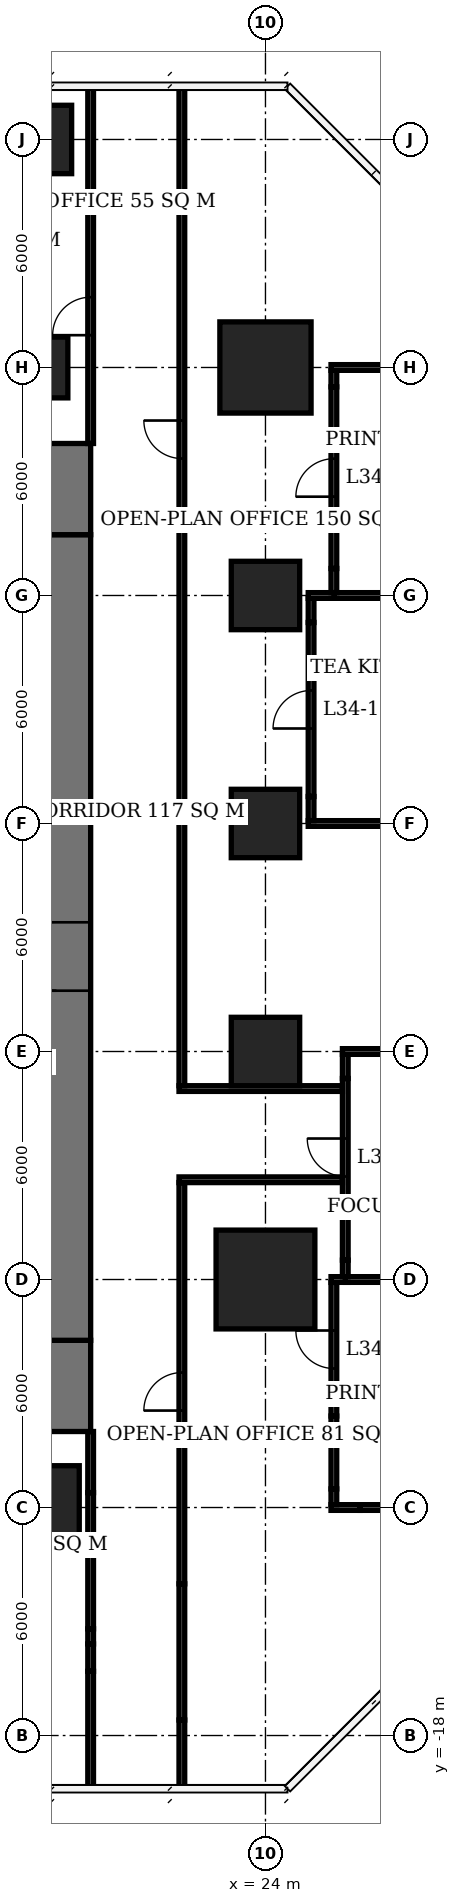
"""IFC4 building model, lengths in metres.
Left out: names, types, materials, properties, quantities, classifications, styles, units other than length and angle.
Written with IfcOpenShell. Run it as: python <this file> out.ifc"""

import sys

from ifc_helpers import new_model, si_unit, direction, frame, frame_2d, origin, origin_2d, place, context, subcontext, project, spatial, rectangle, extrude, element, fill, save


model = new_model("IFC4")
c1 = context("Model", 3, precision=1e-05, world=origin(), true_north=direction((0.0, 1.0)))
c2 = subcontext(c1, "Body", "Model", "MODEL_VIEW")
j1 = project(units=[si_unit("LENGTHUNIT", "METRE"), si_unit("PLANEANGLEUNIT", "RADIAN")], contexts=[c1])
p1 = place(None, origin())
s1 = spatial("IfcSite", under=j1, at=p1, CompositionType="ELEMENT")
p2 = place(p1, origin())
s2 = spatial("IfcBuilding", under=s1, at=p2, CompositionType="ELEMENT")
p3 = place(p2, frame((0.0, 0.0, 140.6)))
s3 = spatial("IfcBuildingStorey", under=s2, at=p3, CompositionType="ELEMENT", Elevation=140.6)
p4 = place(p3, frame((18.0, -12.0, 0.0), z_axis=(0.0, 0.0, 1.0), x_axis=(1.0, 0.0, 0.0)))
e1 = element("IfcColumn", 1, at=p4, inside=s3, PredefinedType="COLUMN", context=c2, shape_type="SweptSolid", body=[
    extrude(rectangle(XDim=2.2, YDim=2.2, at=origin_2d()), origin(), (0.0, 0.0, 1.0), 3.9),
])
p5 = place(p3, frame((18.0, 18.0, 0.0), z_axis=(0.0, 0.0, 1.0), x_axis=(1.0, 0.0, 0.0)))
e2 = element("IfcColumn", 2, at=p5, inside=s3, PredefinedType="COLUMN", context=c2, shape_type="SweptSolid", body=[
    extrude(rectangle(XDim=1.6, YDim=1.6, at=origin_2d()), origin(), (0.0, 0.0, 1.0), 3.9),
])
p6 = place(p3, frame((18.0, 24.0, 0.0), z_axis=(0.0, 0.0, 1.0), x_axis=(1.0, 0.0, 0.0)))
e3 = element("IfcColumn", 3, at=p6, inside=s3, PredefinedType="COLUMN", context=c2, shape_type="SweptSolid", body=[
    extrude(rectangle(XDim=1.8, YDim=1.8, at=origin_2d()), origin(), (0.0, 0.0, 1.0), 3.9),
])
p7 = place(p3, frame((24.0, -6.0, 0.0), z_axis=(0.0, 0.0, 1.0), x_axis=(1.0, 0.0, 0.0)))
e4 = element("IfcColumn", 4, at=p7, inside=s3, PredefinedType="COLUMN", context=c2, shape_type="SweptSolid", body=[
    extrude(rectangle(XDim=2.6, YDim=2.6, at=origin_2d()), origin(), (0.0, 0.0, 1.0), 3.9),
])
for number, where, z_axis, x_axis in (
    (5, (24.0, 0.0, 0.0), (0.0, 0.0, 1.0), (1.0, 0.0, 0.0)),
    (6, (24.0, 6.0, 0.0), (0.0, 0.0, 1.0), (1.0, 0.0, 0.0)),
    (7, (24.0, 12.0, 0.0), (0.0, 0.0, 1.0), (1.0, 0.0, 0.0)),
):
    element("IfcColumn", number, at=place(p3, frame(where, z_axis=z_axis, x_axis=x_axis)), inside=s3, PredefinedType="COLUMN", context=c2, shape_type="SweptSolid", body=[
        extrude(rectangle(XDim=1.8, YDim=1.8, at=origin_2d()), origin(), (0.0, 0.0, 1.0), 3.9),
    ])
p8 = place(p3, frame((24.0, 18.0, 0.0), z_axis=(0.0, 0.0, 1.0), x_axis=(1.0, 0.0, 0.0)))
e8 = element("IfcColumn", 8, at=p8, inside=s3, PredefinedType="COLUMN", context=c2, shape_type="SweptSolid", body=[
    extrude(rectangle(XDim=2.4, YDim=2.4, at=origin_2d()), origin(), (0.0, 0.0, 1.0), 3.9),
])
p9 = place(p3, frame((18.5, -7.6, 0.0), z_axis=(0.0, 0.0, 1.0), x_axis=(0.0, 1.0, 0.0)))
e9 = element("IfcWall", 9, at=p9, inside=s3, PredefinedType="SHEAR", context=c2, shape_type="SweptSolid", body=[
    extrude(rectangle(XDim=21.2, YDim=1.8, at=frame_2d((10.6, 0.0))), origin(), (0.0, 0.0, 1.0), 3.9),
])
p10 = place(p9, frame((9.2, 0.0, 0.0)))
e10 = element("IfcOpeningElement", 10, at=p10, cuts=e9, PredefinedType="OPENING", context=c2, shape_type="SweptSolid", body=[
    extrude(rectangle(XDim=1.8, YDim=2.4, at=frame_2d((0.9, 1.2))), frame((0.0, 0.91, 0.0), z_axis=(0.0, -1.0, 0.0), x_axis=(1.0, 0.0, 0.0)), (0.0, 0.0, 1.0), 1.82),
])
for number, where, z_axis, x_axis in (
    (11, (18.5, -10.0, 0.0), (0.0, 0.0, 1.0), (0.0, 1.0, 0.0)),
    (12, (18.5, 13.6, 0.0), (0.0, 0.0, 1.0), (0.0, 1.0, 0.0)),
):
    element("IfcWall", number, at=place(p3, frame(where, z_axis=z_axis, x_axis=x_axis)), inside=s3, PredefinedType="SHEAR", context=c2, shape_type="SweptSolid", body=[
        extrude(rectangle(XDim=2.4, YDim=1.8, at=frame_2d((1.2, 0.0))), origin(), (0.0, 0.0, 1.0), 3.9),
    ])
p11 = place(p3, frame((25.725, -12.0, 0.0), z_axis=(0.0, 0.0, 1.0), x_axis=(1.0, 0.0, 0.0)))
e13 = element("IfcWall", 13, at=p11, inside=s3, PredefinedType="PARTITIONING", context=c2, shape_type="SweptSolid", body=[
    extrude(rectangle(XDim=0.765, YDim=0.15, at=frame_2d((0.382, 0.0))), origin(), (0.0, 0.0, 1.0), 2.65),
])
p12 = place(p3, frame((26.49, -12.0, 0.0), z_axis=(0.0, 0.0, 1.0), x_axis=(1.0, 0.0, 0.0)))
e14 = element("IfcWall", 14, at=p12, inside=s3, PredefinedType="PARTITIONING", context=c2, shape_type="SweptSolid", body=[
    extrude(rectangle(XDim=1.718, YDim=0.15, at=frame_2d((0.859, 0.0))), origin(), (0.0, 0.0, 1.0), 3.65),
])
p13 = place(p3, frame((25.725, -6.0, 0.0), z_axis=(0.0, 0.0, 1.0), x_axis=(1.0, 0.0, 0.0)))
e15 = element("IfcWall", 15, at=p13, inside=s3, PredefinedType="PARTITIONING", context=c2, shape_type="SweptSolid", body=[
    extrude(rectangle(XDim=0.45, YDim=0.15, at=frame_2d((0.225, 0.0))), origin(), (0.0, 0.0, 1.0), 2.65),
])
p14 = place(p3, frame((26.1, -6.0, 0.0), z_axis=(0.0, 0.0, 1.0), x_axis=(1.0, 0.0, 0.0)))
e16 = element("IfcWall", 16, at=p14, inside=s3, PredefinedType="PARTITIONING", context=c2, shape_type="SweptSolid", body=[
    extrude(rectangle(XDim=2.21, YDim=0.15, at=frame_2d((1.105, 0.0))), origin(), (0.0, 0.0, 1.0), 2.65),
])
p15 = place(p3, frame((26.025, 0.0, 0.0), z_axis=(0.0, 0.0, 1.0), x_axis=(1.0, 0.0, 0.0)))
e17 = element("IfcWall", 17, at=p15, inside=s3, PredefinedType="PARTITIONING", context=c2, shape_type="SweptSolid", body=[
    extrude(rectangle(XDim=2.285, YDim=0.15, at=frame_2d((1.143, 0.0))), origin(), (0.0, 0.0, 1.0), 2.65),
])
p16 = place(p3, frame((25.125, 6.0, 0.0), z_axis=(0.0, 0.0, 1.0), x_axis=(1.0, 0.0, 0.0)))
e18 = element("IfcWall", 18, at=p16, inside=s3, PredefinedType="PARTITIONING", context=c2, shape_type="SweptSolid", body=[
    extrude(rectangle(XDim=3.185, YDim=0.15, at=frame_2d((1.593, 0.0))), origin(), (0.0, 0.0, 1.0), 2.65),
])
p17 = place(p3, frame((25.125, 12.0, 0.0), z_axis=(0.0, 0.0, 1.0), x_axis=(1.0, 0.0, 0.0)))
e19 = element("IfcWall", 19, at=p17, inside=s3, PredefinedType="PARTITIONING", context=c2, shape_type="SweptSolid", body=[
    extrude(rectangle(XDim=0.75, YDim=0.15, at=frame_2d((0.375, 0.0))), origin(), (0.0, 0.0, 1.0), 2.65),
])
p18 = place(p3, frame((25.8, 12.0, 0.0), z_axis=(0.0, 0.0, 1.0), x_axis=(1.0, 0.0, 0.0)))
e20 = element("IfcWall", 20, at=p18, inside=s3, PredefinedType="PARTITIONING", context=c2, shape_type="SweptSolid", body=[
    extrude(rectangle(XDim=2.51, YDim=0.15, at=frame_2d((1.255, 0.0))), origin(), (0.0, 0.0, 1.0), 2.65),
])
p19 = place(p3, frame((25.725, 18.0, 0.0), z_axis=(0.0, 0.0, 1.0), x_axis=(1.0, 0.0, 0.0)))
e21 = element("IfcWall", 21, at=p19, inside=s3, PredefinedType="PARTITIONING", context=c2, shape_type="SweptSolid", body=[
    extrude(rectangle(XDim=2.585, YDim=0.15, at=frame_2d((1.292, 0.0))), origin(), (0.0, 0.0, 1.0), 2.65),
])
p20 = place(p3, frame((25.2, 6.075, 0.0), z_axis=(0.0, 0.0, 1.0), x_axis=(0.0, 1.0, 0.0)))
e22 = element("IfcWall", 22, at=p20, inside=s3, PredefinedType="PARTITIONING", context=c2, shape_type="SweptSolid", body=[
    extrude(rectangle(XDim=0.635, YDim=0.15, at=frame_2d((0.317, 0.0))), origin(), (0.0, 0.0, 1.0), 2.65),
])
p21 = place(p3, frame((25.2, 6.71, 0.0), z_axis=(0.0, 0.0, 1.0), x_axis=(0.0, 1.0, 0.0)))
e23 = element("IfcWall", 23, at=p21, inside=s3, PredefinedType="PARTITIONING", context=c2, shape_type="SweptSolid", body=[
    extrude(rectangle(XDim=4.58, YDim=0.15, at=frame_2d((2.29, 0.0))), origin(), (0.0, 0.0, 1.0), 3.65),
])
p22 = place(p21, frame((1.79, 0.0, 0.0)))
e24 = element("IfcOpeningElement", 24, at=p22, cuts=e23, PredefinedType="OPENING", context=c2, shape_type="SweptSolid", body=[
    extrude(rectangle(XDim=1.0, YDim=2.1, at=frame_2d((0.5, 1.05))), frame((0.0, 0.085, 0.0), z_axis=(0.0, -1.0, 0.0), x_axis=(1.0, 0.0, 0.0)), (0.0, 0.0, 1.0), 0.17),
])
p23 = place(p3, frame((25.2, 11.29, 0.0), z_axis=(0.0, 0.0, 1.0), x_axis=(0.0, 1.0, 0.0)))
e25 = element("IfcWall", 25, at=p23, inside=s3, PredefinedType="PARTITIONING", context=c2, shape_type="SweptSolid", body=[
    extrude(rectangle(XDim=0.635, YDim=0.15, at=frame_2d((0.317, 0.0))), origin(), (0.0, 0.0, 1.0), 2.65),
])
p24 = place(p3, frame((25.8, -11.925, 0.0), z_axis=(0.0, 0.0, 1.0), x_axis=(0.0, 1.0, 0.0)))
e26 = element("IfcWall", 26, at=p24, inside=s3, PredefinedType="PARTITIONING", context=c2, shape_type="SweptSolid", body=[
    extrude(rectangle(XDim=0.415, YDim=0.15, at=frame_2d((0.208, 0.0))), origin(), (0.0, 0.0, 1.0), 2.65),
])
p25 = place(p3, frame((25.8, -11.51, 0.0), z_axis=(0.0, 0.0, 1.0), x_axis=(0.0, 1.0, 0.0)))
e27 = element("IfcWall", 27, at=p25, inside=s3, PredefinedType="PARTITIONING", context=c2, shape_type="SweptSolid", body=[
    extrude(rectangle(XDim=1.918, YDim=0.15, at=frame_2d((0.959, 0.0))), origin(), (0.0, 0.0, 1.0), 3.65),
])
p26 = place(p3, frame((25.8, -9.592, 0.0), z_axis=(0.0, 0.0, 1.0), x_axis=(0.0, 1.0, 0.0)))
e28 = element("IfcWall", 28, at=p26, inside=s3, PredefinedType="PARTITIONING", context=c2, shape_type="SweptSolid", body=[
    extrude(rectangle(XDim=3.517, YDim=0.15, at=frame_2d((1.759, 0.0))), origin(), (0.0, 0.0, 1.0), 2.65),
])
p27 = place(p26, frame((1.25, 0.0, 0.0)))
e29 = element("IfcOpeningElement", 29, at=p27, cuts=e28, PredefinedType="OPENING", context=c2, shape_type="SweptSolid", body=[
    extrude(rectangle(XDim=1.0, YDim=2.1, at=frame_2d((0.5, 1.05))), frame((0.0, 0.085, 0.0), z_axis=(0.0, -1.0, 0.0), x_axis=(1.0, 0.0, 0.0)), (0.0, 0.0, 1.0), 0.17),
])
p28 = place(p3, frame((25.8, 12.075, 0.0), z_axis=(0.0, 0.0, 1.0), x_axis=(0.0, 1.0, 0.0)))
e30 = element("IfcWall", 30, at=p28, inside=s3, PredefinedType="PARTITIONING", context=c2, shape_type="SweptSolid", body=[
    extrude(rectangle(XDim=0.635, YDim=0.15, at=frame_2d((0.317, 0.0))), origin(), (0.0, 0.0, 1.0), 2.65),
])
p29 = place(p3, frame((25.8, 12.71, 0.0), z_axis=(0.0, 0.0, 1.0), x_axis=(0.0, 1.0, 0.0)))
e31 = element("IfcWall", 31, at=p29, inside=s3, PredefinedType="PARTITIONING", context=c2, shape_type="SweptSolid", body=[
    extrude(rectangle(XDim=4.78, YDim=0.15, at=frame_2d((2.39, 0.0))), origin(), (0.0, 0.0, 1.0), 3.65),
])
p30 = place(p29, frame((1.89, 0.0, 0.0)))
e32 = element("IfcOpeningElement", 32, at=p30, cuts=e31, PredefinedType="OPENING", context=c2, shape_type="SweptSolid", body=[
    extrude(rectangle(XDim=1.0, YDim=2.1, at=frame_2d((0.5, 1.05))), frame((0.0, 0.085, 0.0), z_axis=(0.0, -1.0, 0.0), x_axis=(1.0, 0.0, 0.0)), (0.0, 0.0, 1.0), 0.17),
])
for number, where, z_axis, x_axis in (
    (33, (25.8, 17.49, 0.0), (0.0, 0.0, 1.0), (0.0, 1.0, 0.0)),
    (34, (26.1, -5.925, 0.0), (0.0, 0.0, 1.0), (0.0, 1.0, 0.0)),
):
    element("IfcWall", number, at=place(p3, frame(where, z_axis=z_axis, x_axis=x_axis)), inside=s3, PredefinedType="PARTITIONING", context=c2, shape_type="SweptSolid", body=[
        extrude(rectangle(XDim=0.435, YDim=0.15, at=frame_2d((0.218, 0.0))), origin(), (0.0, 0.0, 1.0), 2.65),
    ])
p31 = place(p3, frame((26.1, -5.49, 0.0), z_axis=(0.0, 0.0, 1.0), x_axis=(0.0, 1.0, 0.0)))
e35 = element("IfcWall", 35, at=p31, inside=s3, PredefinedType="PARTITIONING", context=c2, shape_type="SweptSolid", body=[
    extrude(rectangle(XDim=4.78, YDim=0.15, at=frame_2d((2.39, 0.0))), origin(), (0.0, 0.0, 1.0), 3.65),
])
p32 = place(p31, frame((2.2, 0.0, 0.0)))
e36 = element("IfcOpeningElement", 36, at=p32, cuts=e35, PredefinedType="OPENING", context=c2, shape_type="SweptSolid", body=[
    extrude(rectangle(XDim=1.0, YDim=2.1, at=frame_2d((0.5, 1.05))), frame((0.0, 0.085, 0.0), z_axis=(0.0, -1.0, 0.0), x_axis=(1.0, 0.0, 0.0)), (0.0, 0.0, 1.0), 0.17),
])
p33 = place(p3, frame((26.1, -0.71, 0.0), z_axis=(0.0, 0.0, 1.0), x_axis=(0.0, 1.0, 0.0)))
e37 = element("IfcWall", 37, at=p33, inside=s3, PredefinedType="PARTITIONING", context=c2, shape_type="SweptSolid", body=[
    extrude(rectangle(XDim=0.635, YDim=0.15, at=frame_2d((0.317, 0.0))), origin(), (0.0, 0.0, 1.0), 2.65),
])
p34 = place(p3, frame((19.4, -19.4, 0.0), z_axis=(0.0, 0.0, 1.0), x_axis=(0.0, 1.0, 0.0)))
e38 = element("IfcWall", 38, at=p34, inside=s3, PredefinedType="PARTITIONING", context=c2, shape_type="SweptSolid", body=[
    extrude(rectangle(XDim=3.09, YDim=0.15, at=frame_2d((1.545, 0.0))), origin(), (0.0, 0.0, 1.0), 3.65),
])
p35 = place(p3, frame((19.4, -16.31, 0.0), z_axis=(0.0, 0.0, 1.0), x_axis=(0.0, 1.0, 0.0)))
e39 = element("IfcWall", 39, at=p35, inside=s3, PredefinedType="PARTITIONING", context=c2, shape_type="SweptSolid", body=[
    extrude(rectangle(XDim=0.72, YDim=0.15, at=frame_2d((0.36, 0.0))), origin(), (0.0, 0.0, 1.0), 2.65),
])
p36 = place(p3, frame((19.4, -15.59, 0.0), z_axis=(0.0, 0.0, 1.0), x_axis=(0.0, 1.0, 0.0)))
e40 = element("IfcWall", 40, at=p36, inside=s3, PredefinedType="PARTITIONING", context=c2, shape_type="SweptSolid", body=[
    extrude(rectangle(XDim=0.398, YDim=0.15, at=frame_2d((0.199, 0.0))), origin(), (0.0, 0.0, 1.0), 3.65),
])
p37 = place(p3, frame((19.4, -15.192, 0.0), z_axis=(0.0, 0.0, 1.0), x_axis=(0.0, 1.0, 0.0)))
e41 = element("IfcWall", 41, at=p37, inside=s3, PredefinedType="PARTITIONING", context=c2, shape_type="SweptSolid", body=[
    extrude(rectangle(XDim=3.584, YDim=0.15, at=frame_2d((1.792, 0.0))), origin(), (0.0, 0.0, 1.0), 2.65),
])
p38 = place(p3, frame((19.4, -11.608, 0.0), z_axis=(0.0, 0.0, 1.0), x_axis=(0.0, 1.0, 0.0)))
e42 = element("IfcWall", 42, at=p38, inside=s3, PredefinedType="PARTITIONING", context=c2, shape_type="SweptSolid", body=[
    extrude(rectangle(XDim=1.608, YDim=0.15, at=frame_2d((0.804, 0.0))), origin(), (0.0, 0.0, 1.0), 3.65),
])
p39 = place(p3, frame((19.4, 16.0, 0.0), z_axis=(0.0, 0.0, 1.0), x_axis=(0.0, 1.0, 0.0)))
e43 = element("IfcWall", 43, at=p39, inside=s3, PredefinedType="PARTITIONING", context=c2, shape_type="SweptSolid", body=[
    extrude(rectangle(XDim=9.4, YDim=0.15, at=frame_2d((4.7, 0.0))), origin(), (0.0, 0.0, 1.0), 3.65),
])
p40 = place(p39, frame((2.85, 0.0, 0.0)))
e44 = element("IfcOpeningElement", 44, at=p40, cuts=e43, PredefinedType="OPENING", context=c2, shape_type="SweptSolid", body=[
    extrude(rectangle(XDim=1.0, YDim=2.1, at=frame_2d((0.5, 1.05))), frame((0.0, 0.085, 0.0), z_axis=(0.0, -1.0, 0.0), x_axis=(1.0, 0.0, 0.0)), (0.0, 0.0, 1.0), 0.17),
])
p41 = place(p3, frame((21.8, -19.4, 0.0), z_axis=(0.0, 0.0, 1.0), x_axis=(0.0, 1.0, 0.0)))
e45 = element("IfcWall", 45, at=p41, inside=s3, PredefinedType="PARTITIONING", context=c2, shape_type="SweptSolid", body=[
    extrude(rectangle(XDim=1.808, YDim=0.15, at=frame_2d((0.904, 0.0))), origin(), (0.0, 0.0, 1.0), 3.65),
])
p42 = place(p3, frame((21.8, -17.592, 0.0), z_axis=(0.0, 0.0, 1.0), x_axis=(0.0, 1.0, 0.0)))
e46 = element("IfcWall", 46, at=p42, inside=s3, PredefinedType="PARTITIONING", context=c2, shape_type="SweptSolid", body=[
    extrude(rectangle(XDim=3.584, YDim=0.15, at=frame_2d((1.792, 0.0))), origin(), (0.0, 0.0, 1.0), 2.65),
])
p43 = place(p3, frame((21.8, -14.008, 0.0), z_axis=(0.0, 0.0, 1.0), x_axis=(0.0, 1.0, 0.0)))
e47 = element("IfcWall", 47, at=p43, inside=s3, PredefinedType="PARTITIONING", context=c2, shape_type="SweptSolid", body=[
    extrude(rectangle(XDim=10.558, YDim=0.15, at=frame_2d((5.279, 0.0))), origin(), (0.0, 0.0, 1.0), 3.65),
])
p44 = place(p43, frame((4.559, 0.0, 0.0)))
e48 = element("IfcOpeningElement", 48, at=p44, cuts=e47, PredefinedType="OPENING", context=c2, shape_type="SweptSolid", body=[
    extrude(rectangle(XDim=1.0, YDim=2.1, at=frame_2d((0.5, 1.05))), frame((0.0, 0.085, 0.0), z_axis=(0.0, -1.0, 0.0), x_axis=(1.0, 0.0, 0.0)), (0.0, 0.0, 1.0), 0.17),
])
p45 = place(p3, frame((21.725, -3.375, 0.0), z_axis=(0.0, 0.0, 1.0), x_axis=(1.0, 0.0, 0.0)))
e49 = element("IfcWall", 49, at=p45, inside=s3, PredefinedType="PARTITIONING", context=c2, shape_type="SweptSolid", body=[
    extrude(rectangle(XDim=4.3, YDim=0.15, at=frame_2d((2.15, 0.0))), origin(), (0.0, 0.0, 1.0), 3.65),
])
p46 = place(p3, frame((21.8, -0.9, 0.0), z_axis=(0.0, 0.0, 1.0), x_axis=(0.0, 1.0, 0.0)))
e50 = element("IfcWall", 50, at=p46, inside=s3, PredefinedType="PARTITIONING", context=c2, shape_type="SweptSolid", body=[
    extrude(rectangle(XDim=26.3, YDim=0.15, at=frame_2d((13.15, 0.0))), origin(), (0.0, 0.0, 1.0), 3.65),
])
p47 = place(p46, frame((16.504, 0.0, 0.0)))
e51 = element("IfcOpeningElement", 51, at=p47, cuts=e50, PredefinedType="OPENING", context=c2, shape_type="SweptSolid", body=[
    extrude(rectangle(XDim=1.0, YDim=2.1, at=frame_2d((0.5, 1.05))), frame((0.0, 0.085, 0.0), z_axis=(0.0, -1.0, 0.0), x_axis=(1.0, 0.0, 0.0)), (0.0, 0.0, 1.0), 0.17),
])
p48 = place(p3, frame((21.725, -0.975, 0.0), z_axis=(0.0, 0.0, 1.0), x_axis=(1.0, 0.0, 0.0)))
e52 = element("IfcWall", 52, at=p48, inside=s3, PredefinedType="PARTITIONING", context=c2, shape_type="SweptSolid", body=[
    extrude(rectangle(XDim=4.3, YDim=0.15, at=frame_2d((2.15, 0.0))), origin(), (0.0, 0.0, 1.0), 3.65),
])
p49 = place(p10, origin())
e53 = element("IfcDoor", 53, at=p49, inside=s3, OperationType="DOUBLE_DOOR_SINGLE_SWING", PredefinedType="DOOR", context=c2, shape_type="SweptSolid", body=[
    extrude(rectangle(XDim=1.8, YDim=2.4, at=frame_2d((0.9, 1.2))), frame((0.0, 0.025, 0.0), z_axis=(0.0, -1.0, 0.0), x_axis=(1.0, 0.0, 0.0)), (0.0, 0.0, 1.0), 0.05),
])
fill(e10, e53)
p50 = place(p27, origin())
e54 = element("IfcDoor", 54, at=p50, inside=s3, OperationType="SINGLE_SWING_RIGHT", PredefinedType="DOOR", context=c2, shape_type="SweptSolid", body=[
    extrude(rectangle(XDim=1.0, YDim=2.1, at=frame_2d((0.5, 1.05))), frame((0.0, 0.025, 0.0), z_axis=(0.0, -1.0, 0.0), x_axis=(1.0, 0.0, 0.0)), (0.0, 0.0, 1.0), 0.05),
])
fill(e29, e54)
p51 = place(p32, origin())
e55 = element("IfcDoor", 55, at=p51, inside=s3, OperationType="SINGLE_SWING_RIGHT", PredefinedType="DOOR", context=c2, shape_type="SweptSolid", body=[
    extrude(rectangle(XDim=1.0, YDim=2.1, at=frame_2d((0.5, 1.05))), frame((0.0, 0.025, 0.0), z_axis=(0.0, -1.0, 0.0), x_axis=(1.0, 0.0, 0.0)), (0.0, 0.0, 1.0), 0.05),
])
fill(e36, e55)
p52 = place(p22, origin())
e56 = element("IfcDoor", 56, at=p52, inside=s3, OperationType="SINGLE_SWING_LEFT", PredefinedType="DOOR", context=c2, shape_type="SweptSolid", body=[
    extrude(rectangle(XDim=1.0, YDim=2.1, at=frame_2d((0.5, 1.05))), frame((0.0, 0.025, 0.0), z_axis=(0.0, -1.0, 0.0), x_axis=(1.0, 0.0, 0.0)), (0.0, 0.0, 1.0), 0.05),
])
fill(e24, e56)
p53 = place(p30, origin())
e57 = element("IfcDoor", 57, at=p53, inside=s3, OperationType="SINGLE_SWING_LEFT", PredefinedType="DOOR", context=c2, shape_type="SweptSolid", body=[
    extrude(rectangle(XDim=1.0, YDim=2.1, at=frame_2d((0.5, 1.05))), frame((0.0, 0.025, 0.0), z_axis=(0.0, -1.0, 0.0), x_axis=(1.0, 0.0, 0.0)), (0.0, 0.0, 1.0), 0.05),
])
fill(e32, e57)
p54 = place(p44, origin())
e58 = element("IfcDoor", 58, at=p54, inside=s3, OperationType="SINGLE_SWING_LEFT", PredefinedType="DOOR", context=c2, shape_type="SweptSolid", body=[
    extrude(rectangle(XDim=1.0, YDim=2.1, at=frame_2d((0.5, 1.05))), frame((0.0, 0.025, 0.0), z_axis=(0.0, -1.0, 0.0), x_axis=(1.0, 0.0, 0.0)), (0.0, 0.0, 1.0), 0.05),
])
fill(e48, e58)
p55 = place(p47, origin())
e59 = element("IfcDoor", 59, at=p55, inside=s3, OperationType="SINGLE_SWING_RIGHT", PredefinedType="DOOR", context=c2, shape_type="SweptSolid", body=[
    extrude(rectangle(XDim=1.0, YDim=2.1, at=frame_2d((0.5, 1.05))), frame((0.0, 0.025, 0.0), z_axis=(0.0, -1.0, 0.0), x_axis=(1.0, 0.0, 0.0)), (0.0, 0.0, 1.0), 0.05),
])
fill(e51, e59)
p56 = place(p40, origin())
e60 = element("IfcDoor", 60, at=p56, inside=s3, OperationType="SINGLE_SWING_LEFT", PredefinedType="DOOR", context=c2, shape_type="SweptSolid", body=[
    extrude(rectangle(XDim=1.0, YDim=2.1, at=frame_2d((0.5, 1.05))), frame((0.0, 0.025, 0.0), z_axis=(0.0, -1.0, 0.0), x_axis=(1.0, 0.0, 0.0)), (0.0, 0.0, 1.0), 0.05),
])
fill(e44, e60)
save(model, sys.argv[1])
